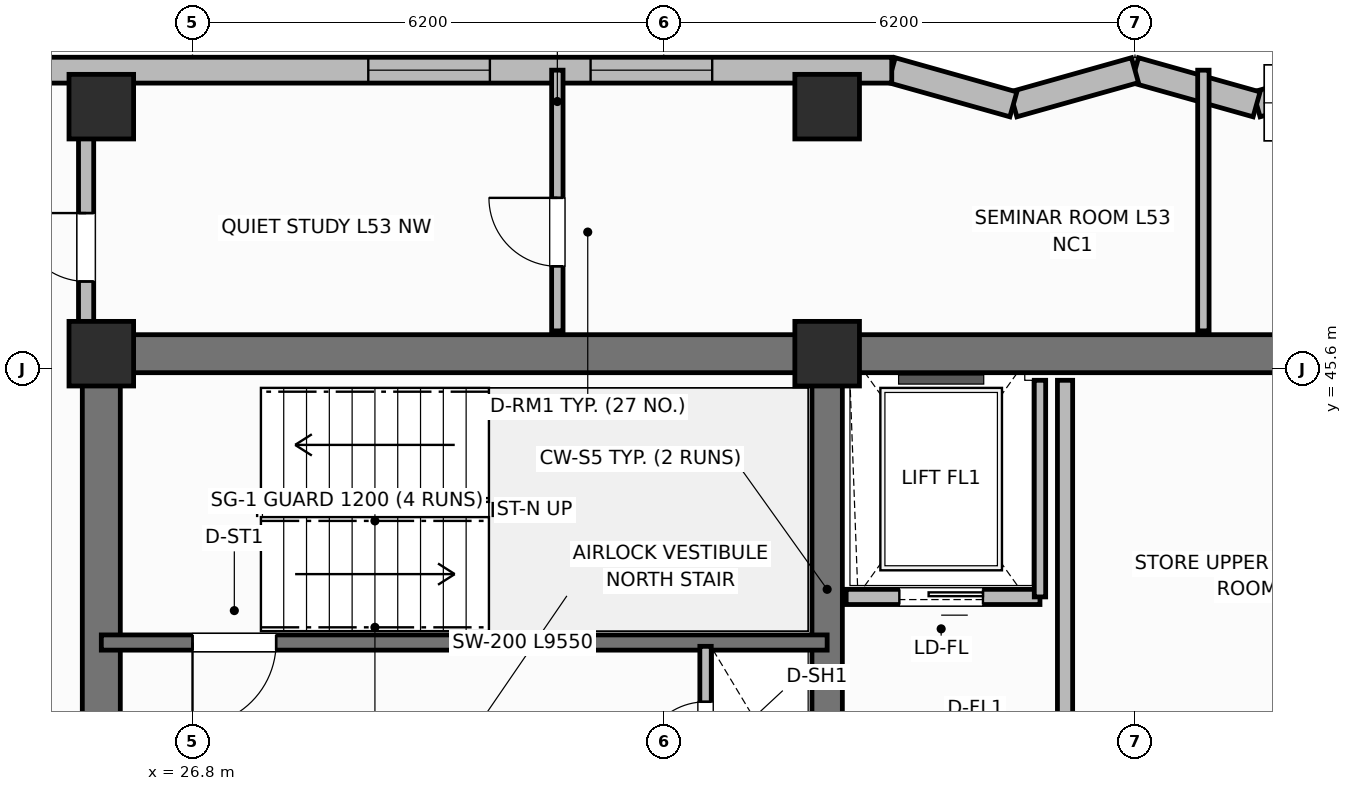
"""IFC4 building model, lengths in metres.
Left out: names, types, materials, properties, quantities, classifications, styles, units other than length and angle.
Written with IfcOpenShell. Run it as: python <this file> out.ifc"""

import sys

from ifc_helpers import new_model, si_unit, direction, frame, frame_2d, origin, origin_2d, place, context, subcontext, project, spatial, rectangle, extrude, element, fill, save


model = new_model("IFC4")
c1 = context("Model", 3, precision=1e-05, world=origin(), true_north=direction((0.0, 1.0)))
c2 = subcontext(c1, "Body", "Model", "MODEL_VIEW")
j1 = project(units=[si_unit("LENGTHUNIT", "METRE"), si_unit("PLANEANGLEUNIT", "RADIAN")], contexts=[c1])
p1 = place(None, origin())
s1 = spatial("IfcSite", under=j1, at=p1, CompositionType="ELEMENT")
p2 = place(p1, origin())
s2 = spatial("IfcBuilding", under=s1, at=p2, CompositionType="ELEMENT")
p3 = place(p2, frame((0.0, 0.0, 214.7)))
s3 = spatial("IfcBuildingStorey", under=s2, at=p3, CompositionType="ELEMENT", Elevation=214.7)
p4 = place(p3, frame((25.6, 45.8, 0.0), z_axis=(0.0, 0.0, 1.0), x_axis=(1.0, 0.0, 0.0)))
e1 = element("IfcWall", 1, at=p4, inside=s3, PredefinedType="SHEAR", context=c2, shape_type="SweptSolid", body=[
    extrude(rectangle(XDim=27.2, YDim=0.5, at=frame_2d((13.6, 0.0))), origin(), (0.0, 0.0, 1.0), 3.7),
])
p5 = place(p3, frame((25.6, 39.85, 0.0), z_axis=(0.0, 0.0, 1.0), x_axis=(0.0, 1.0, 0.0)))
e2 = element("IfcWall", 2, at=p5, inside=s3, PredefinedType="SHEAR", context=c2, shape_type="SweptSolid", body=[
    extrude(rectangle(XDim=5.7, YDim=0.5, at=frame_2d((2.85, 0.0))), origin(), (0.0, 0.0, 1.0), 3.7),
])
p6 = place(p3, frame((35.15, 39.85, 0.0), z_axis=(0.0, 0.0, 1.0), x_axis=(0.0, 1.0, 0.0)))
e3 = element("IfcWall", 3, at=p6, inside=s3, PredefinedType="SHEAR", context=c2, shape_type="SweptSolid", body=[
    extrude(rectangle(XDim=5.7, YDim=0.4, at=frame_2d((2.85, 0.0))), origin(), (0.0, 0.0, 1.0), 3.7),
])
for number, where, z_axis, x_axis in (
    (4, (25.6, 45.8, 0.0), (0.0, 0.0, 1.0), (1.0, 0.0, 0.0)),
    (5, (35.15, 45.8, 0.0), (0.0, 0.0, 1.0), (1.0, 0.0, 0.0)),
    (6, (25.6, 49.05, 0.0), (0.0, 0.0, 1.0), (1.0, 0.0, 0.0)),
    (7, (35.15, 49.05, 0.0), (0.0, 0.0, 1.0), (1.0, 0.0, 0.0)),
):
    element("IfcColumn", number, at=place(p3, frame(where, z_axis=z_axis, x_axis=x_axis)), inside=s3, PredefinedType="COLUMN", context=c2, shape_type="SweptSolid", body=[
        extrude(rectangle(XDim=0.85, YDim=0.85, at=origin_2d()), origin(), (0.0, 0.0, 1.0), 3.7),
    ])
p7 = place(p3, frame((42.4, 49.53, 0.0), z_axis=(0.0, 0.0, 1.0), x_axis=(-0.962652136636, -0.270741322725, 0.0)))
e8 = element("IfcWall", 8, at=p7, inside=s3, PredefinedType="SOLIDWALL", context=c2, shape_type="SweptSolid", body=[
    extrude(rectangle(XDim=1.662, YDim=0.34, at=frame_2d((0.831, 0.0))), origin(), (0.0, 0.0, 1.0), 2.72),
])
p8 = place(p3, frame((40.8, 49.08, 0.0), z_axis=(0.0, 0.0, 1.0), x_axis=(-0.962662902433, 0.270703040766, 0.0)))
e9 = element("IfcWall", 9, at=p8, inside=s3, PredefinedType="SOLIDWALL", context=c2, shape_type="SweptSolid", body=[
    extrude(rectangle(XDim=1.662, YDim=0.34, at=frame_2d((0.831, 0.0))), origin(), (0.0, 0.0, 1.0), 2.72),
])
p9 = place(p3, frame((39.2, 49.53, 0.0), z_axis=(0.0, 0.0, 1.0), x_axis=(-0.962652136636, -0.270741322725, 0.0)))
e10 = element("IfcWall", 10, at=p9, inside=s3, PredefinedType="SOLIDWALL", context=c2, shape_type="SweptSolid", body=[
    extrude(rectangle(XDim=1.662, YDim=0.34, at=frame_2d((0.831, 0.0))), origin(), (0.0, 0.0, 1.0), 2.72),
])
p10 = place(p3, frame((37.6, 49.08, 0.0), z_axis=(0.0, 0.0, 1.0), x_axis=(-0.962662902433, 0.270703040766, 0.0)))
e11 = element("IfcWall", 11, at=p10, inside=s3, PredefinedType="SOLIDWALL", context=c2, shape_type="SweptSolid", body=[
    extrude(rectangle(XDim=1.662, YDim=0.34, at=frame_2d((0.831, 0.0))), origin(), (0.0, 0.0, 1.0), 2.72),
])
p11 = place(p3, frame((36.0, 49.53, 0.0), z_axis=(0.0, 0.0, 1.0), x_axis=(-1.0, 0.0, 0.0)))
e12 = element("IfcWall", 12, at=p11, inside=s3, PredefinedType="SOLIDWALL", context=c2, shape_type="SweptSolid", body=[
    extrude(rectangle(XDim=15.8, YDim=0.34, at=frame_2d((7.9, 0.0))), origin(), (0.0, 0.0, 1.0), 2.72),
])
p12 = place(p11, frame((2.363, 0.0, 0.7)))
e13 = element("IfcOpeningElement", 13, at=p12, cuts=e12, PredefinedType="OPENING", context=c2, shape_type="SweptSolid", body=[
    extrude(rectangle(XDim=1.6, YDim=1.9, at=frame_2d((0.8, 0.95))), frame((0.0, 0.18, 0.0), z_axis=(0.0, -1.0, 0.0), x_axis=(1.0, 0.0, 0.0)), (0.0, 0.0, 1.0), 0.36),
])
p13 = place(p11, frame((5.288, 0.0, 0.7)))
e14 = element("IfcOpeningElement", 14, at=p13, cuts=e12, PredefinedType="OPENING", context=c2, shape_type="SweptSolid", body=[
    extrude(rectangle(XDim=1.6, YDim=1.9, at=frame_2d((0.8, 0.95))), frame((0.0, 0.18, 0.0), z_axis=(0.0, -1.0, 0.0), x_axis=(1.0, 0.0, 0.0)), (0.0, 0.0, 1.0), 0.36),
])
p14 = place(p11, frame((13.238, 0.0, 0.7)))
e15 = element("IfcOpeningElement", 15, at=p14, cuts=e12, PredefinedType="OPENING", context=c2, shape_type="SweptSolid", body=[
    extrude(rectangle(XDim=1.6, YDim=1.9, at=frame_2d((0.8, 0.95))), frame((0.0, 0.18, 0.0), z_axis=(0.0, -1.0, 0.0), x_axis=(1.0, 0.0, 0.0)), (0.0, 0.0, 1.0), 0.36),
])
p15 = place(p3, frame((35.15, 42.0, 0.0), z_axis=(0.0, 0.0, 1.0), x_axis=(-1.0, 0.0, 0.0)))
e16 = element("IfcWall", 16, at=p15, inside=s3, PredefinedType="SHEAR", context=c2, shape_type="SweptSolid", body=[
    extrude(rectangle(XDim=9.55, YDim=0.2, at=frame_2d((4.775, 0.0))), origin(), (0.0, 0.0, 1.0), 3.7),
])
p16 = place(p15, frame((7.25, 0.0, 0.0)))
e17 = element("IfcOpeningElement", 17, at=p16, cuts=e16, PredefinedType="OPENING", context=c2, shape_type="SweptSolid", body=[
    extrude(rectangle(XDim=1.1, YDim=2.15, at=frame_2d((0.55, 1.075))), frame((0.0, 0.11, 0.0), z_axis=(0.0, -1.0, 0.0), x_axis=(1.0, 0.0, 0.0)), (0.0, 0.0, 1.0), 0.22),
])
p17 = place(p3, frame((33.55, 39.82, 0.0), z_axis=(0.0, 0.0, 1.0), x_axis=(0.0, 1.0, 0.0)))
e18 = element("IfcWall", 18, at=p17, inside=s3, PredefinedType="PARTITIONING", context=c2, shape_type="SweptSolid", body=[
    extrude(rectangle(XDim=2.13, YDim=0.15, at=frame_2d((1.065, 0.0))), origin(), (0.0, 0.0, 1.0), 2.55),
])
p18 = place(p17, frame((0.55, 0.0, 0.0)))
e19 = element("IfcOpeningElement", 19, at=p18, cuts=e18, PredefinedType="OPENING", context=c2, shape_type="SweptSolid", body=[
    extrude(rectangle(XDim=0.85, YDim=2.05, at=frame_2d((0.425, 1.025))), frame((0.0, 0.085, 0.0), z_axis=(0.0, -1.0, 0.0), x_axis=(1.0, 0.0, 0.0)), (0.0, 0.0, 1.0), 0.17),
])
p19 = place(p3, frame((37.95, 42.6, 0.0), z_axis=(0.0, 0.0, 1.0), x_axis=(-1.0, 0.0, 0.0)))
e20 = element("IfcWall", 20, at=p19, inside=s3, PredefinedType="PARTITIONING", context=c2, shape_type="SweptSolid", body=[
    extrude(rectangle(XDim=2.55, YDim=0.2, at=frame_2d((1.275, 0.0))), origin(), (0.0, 0.0, 1.0), 2.32),
])
p20 = place(p19, frame((0.75, 0.0, 0.0)))
e21 = element("IfcOpeningElement", 21, at=p20, cuts=e20, PredefinedType="OPENING", context=c2, shape_type="SweptSolid", body=[
    extrude(rectangle(XDim=1.1, YDim=2.15, at=frame_2d((0.55, 1.075))), frame((0.0, 0.11, 0.0), z_axis=(0.0, -1.0, 0.0), x_axis=(1.0, 0.0, 0.0)), (0.0, 0.0, 1.0), 0.22),
])
p21 = place(p3, frame((37.95, 42.6, 0.0), z_axis=(0.0, 0.0, 1.0), x_axis=(0.0, 1.0, 0.0)))
e22 = element("IfcWall", 22, at=p21, inside=s3, PredefinedType="PARTITIONING", context=c2, shape_type="SweptSolid", body=[
    extrude(rectangle(XDim=2.85, YDim=0.15, at=frame_2d((1.425, 0.0))), origin(), (0.0, 0.0, 1.0), 2.55),
])
p22 = place(p3, frame((38.28, 39.82, 0.0), z_axis=(0.0, 0.0, 1.0), x_axis=(0.0, 1.0, 0.0)))
e23 = element("IfcWall", 23, at=p22, inside=s3, PredefinedType="PARTITIONING", context=c2, shape_type="SweptSolid", body=[
    extrude(rectangle(XDim=5.63, YDim=0.2, at=frame_2d((2.815, 0.0))), origin(), (0.0, 0.0, 1.0), 2.55),
])
p23 = place(p3, frame((31.6, 46.1, 0.0), z_axis=(0.0, 0.0, 1.0), x_axis=(0.0, 1.0, 0.0)))
e24 = element("IfcWall", 24, at=p23, inside=s3, PredefinedType="PARTITIONING", context=c2, shape_type="SweptSolid", body=[
    extrude(rectangle(XDim=3.43, YDim=0.15, at=frame_2d((1.715, 0.0))), origin(), (0.0, 0.0, 1.0), 2.55),
])
p24 = place(p23, frame((0.85, 0.0, 0.0)))
e25 = element("IfcOpeningElement", 25, at=p24, cuts=e24, PredefinedType="OPENING", context=c2, shape_type="SweptSolid", body=[
    extrude(rectangle(XDim=0.9, YDim=2.1, at=frame_2d((0.45, 1.05))), frame((0.0, 0.085, 0.0), z_axis=(0.0, -1.0, 0.0), x_axis=(1.0, 0.0, 0.0)), (0.0, 0.0, 1.0), 0.17),
])
p25 = place(p3, frame((40.1, 46.1, 0.0), z_axis=(0.0, 0.0, 1.0), x_axis=(0.0, 1.0, 0.0)))
e26 = element("IfcWall", 26, at=p25, inside=s3, PredefinedType="PARTITIONING", context=c2, shape_type="SweptSolid", body=[
    extrude(rectangle(XDim=3.43, YDim=0.15, at=frame_2d((1.715, 0.0))), origin(), (0.0, 0.0, 1.0), 2.55),
])
p26 = place(p3, frame((25.4, 46.1, 0.0), z_axis=(0.0, 0.0, 1.0), x_axis=(0.0, 1.0, 0.0)))
e27 = element("IfcWall", 27, at=p26, inside=s3, PredefinedType="PARTITIONING", context=c2, shape_type="SweptSolid", body=[
    extrude(rectangle(XDim=2.73, YDim=0.2, at=frame_2d((1.365, 0.0))), origin(), (0.0, 0.0, 1.0), 2.55),
])
p27 = place(p26, frame((0.65, 0.0, 0.0)))
e28 = element("IfcOpeningElement", 28, at=p27, cuts=e27, PredefinedType="OPENING", context=c2, shape_type="SweptSolid", body=[
    extrude(rectangle(XDim=0.9, YDim=2.1, at=frame_2d((0.45, 1.05))), frame((0.0, 0.11, 0.0), z_axis=(0.0, -1.0, 0.0), x_axis=(1.0, 0.0, 0.0)), (0.0, 0.0, 1.0), 0.22),
])
p28 = place(p12, origin())
e29 = element("IfcWindow", 29, at=p28, inside=s3, PartitioningType="SINGLE_PANEL", PredefinedType="WINDOW", context=c2, shape_type="SweptSolid", body=[
    extrude(rectangle(XDim=1.6, YDim=1.9, at=frame_2d((0.8, 0.95))), frame((0.0, 0.03, 0.0), z_axis=(0.0, -1.0, 0.0), x_axis=(1.0, 0.0, 0.0)), (0.0, 0.0, 1.0), 0.06),
])
fill(e13, e29)
p29 = place(p13, origin())
e30 = element("IfcWindow", 30, at=p29, inside=s3, PartitioningType="SINGLE_PANEL", PredefinedType="WINDOW", context=c2, shape_type="SweptSolid", body=[
    extrude(rectangle(XDim=1.6, YDim=1.9, at=frame_2d((0.8, 0.95))), frame((0.0, 0.03, 0.0), z_axis=(0.0, -1.0, 0.0), x_axis=(1.0, 0.0, 0.0)), (0.0, 0.0, 1.0), 0.06),
])
fill(e14, e30)
p30 = place(p16, origin())
e31 = element("IfcDoor", 31, at=p30, inside=s3, OperationType="SINGLE_SWING_RIGHT", PredefinedType="DOOR", context=c2, shape_type="SweptSolid", body=[
    extrude(rectangle(XDim=1.1, YDim=2.15, at=frame_2d((0.55, 1.075))), frame((0.0, 0.025, 0.0), z_axis=(0.0, -1.0, 0.0), x_axis=(1.0, 0.0, 0.0)), (0.0, 0.0, 1.0), 0.05),
])
fill(e17, e31)
p31 = place(p18, origin())
e32 = element("IfcDoor", 32, at=p31, inside=s3, OperationType="SINGLE_SWING_LEFT", PredefinedType="TRAPDOOR", context=c2, shape_type="SweptSolid", body=[
    extrude(rectangle(XDim=0.85, YDim=2.05, at=frame_2d((0.425, 1.025))), frame((0.0, 0.025, 0.0), z_axis=(0.0, -1.0, 0.0), x_axis=(1.0, 0.0, 0.0)), (0.0, 0.0, 1.0), 0.05),
])
fill(e19, e32)
p32 = place(p20, origin())
e33 = element("IfcDoor", 33, at=p32, inside=s3, OperationType="SLIDING_TO_LEFT", PredefinedType="DOOR", context=c2, shape_type="SweptSolid", body=[
    extrude(rectangle(XDim=1.1, YDim=2.15, at=frame_2d((0.55, 1.075))), frame((0.0, 0.025, 0.0), z_axis=(0.0, -1.0, 0.0), x_axis=(1.0, 0.0, 0.0)), (0.0, 0.0, 1.0), 0.05),
])
fill(e21, e33)
p33 = place(p24, origin())
e34 = element("IfcDoor", 34, at=p33, inside=s3, OperationType="SINGLE_SWING_RIGHT", PredefinedType="DOOR", context=c2, shape_type="SweptSolid", body=[
    extrude(rectangle(XDim=0.9, YDim=2.1, at=frame_2d((0.45, 1.05))), frame((0.0, 0.025, 0.0), z_axis=(0.0, -1.0, 0.0), x_axis=(1.0, 0.0, 0.0)), (0.0, 0.0, 1.0), 0.05),
])
fill(e25, e34)
p34 = place(p27, origin())
e35 = element("IfcDoor", 35, at=p34, inside=s3, OperationType="SINGLE_SWING_RIGHT", PredefinedType="DOOR", context=c2, shape_type="SweptSolid", body=[
    extrude(rectangle(XDim=0.9, YDim=2.1, at=frame_2d((0.45, 1.05))), frame((0.0, 0.025, 0.0), z_axis=(0.0, -1.0, 0.0), x_axis=(1.0, 0.0, 0.0)), (0.0, 0.0, 1.0), 0.05),
])
fill(e28, e35)
save(model, sys.argv[1])
